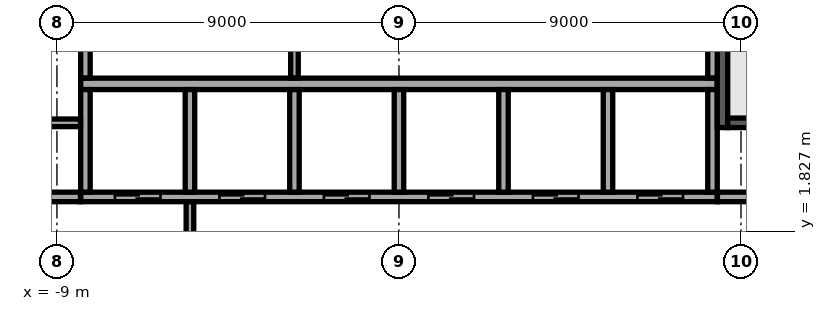
"""IFC4 building model, lengths in metres.
Left out: names, types, materials, properties, quantities, classifications, styles, units other than length and angle.
Written with IfcOpenShell. Run it as: python <this file> out.ifc"""

import sys

from ifc_helpers import new_model, si_unit, direction, frame, frame_2d, origin, place, context, subcontext, project, spatial, rectangle, extrude, element, fill, save


model = new_model("IFC4")
c1 = context("Model", 3, precision=1e-05, world=origin(), true_north=direction((0.0, 1.0)))
c2 = subcontext(c1, "Body", "Model", "MODEL_VIEW")
j1 = project(units=[si_unit("LENGTHUNIT", "METRE"), si_unit("PLANEANGLEUNIT", "RADIAN")], contexts=[c1])
p1 = place(None, origin())
s1 = spatial("IfcSite", under=j1, at=p1, CompositionType="ELEMENT")
p2 = place(p1, origin())
s2 = spatial("IfcBuilding", under=s1, at=p2, CompositionType="ELEMENT")
p3 = place(p2, frame((0.0, 0.0, 225.3)))
s3 = spatial("IfcBuildingStorey", under=s2, at=p3, CompositionType="ELEMENT", Elevation=225.3)
p4 = place(p3, frame((-8.375, 5.7, 0.0), z_axis=(0.0, 0.0, 1.0), x_axis=(1.0, 0.0, 0.0)))
e1 = element("IfcWall", 1, at=p4, inside=s3, PredefinedType="SOLIDWALL", context=c2, shape_type="SweptSolid", body=[
    extrude(rectangle(XDim=16.75, YDim=0.3, at=frame_2d((8.375, 0.0))), origin(), (0.0, 0.0, 1.0), 3.62),
])
p5 = place(p3, frame((-8.375, 2.725, 0.0), z_axis=(0.0, 0.0, 1.0), x_axis=(1.0, 0.0, 0.0)))
e2 = element("IfcWall", 2, at=p5, inside=s3, PredefinedType="SOLIDWALL", context=c2, shape_type="SweptSolid", body=[
    extrude(rectangle(XDim=16.75, YDim=0.25, at=frame_2d((8.375, 0.0))), origin(), (0.0, 0.0, 1.0), 3.62),
])
p6 = place(p5, frame((0.9, 0.0, 0.0)))
e3 = element("IfcOpeningElement", 3, at=p6, cuts=e2, PredefinedType="OPENING", context=c2, shape_type="SweptSolid", body=[
    extrude(rectangle(XDim=1.2, YDim=2.1, at=frame_2d((0.6, 1.05))), frame((0.0, 0.135, 0.0), z_axis=(0.0, -1.0, 0.0), x_axis=(1.0, 0.0, 0.0)), (0.0, 0.0, 1.0), 0.27),
])
p7 = place(p5, frame((3.65, 0.0, 0.0)))
e4 = element("IfcOpeningElement", 4, at=p7, cuts=e2, PredefinedType="OPENING", context=c2, shape_type="SweptSolid", body=[
    extrude(rectangle(XDim=1.2, YDim=2.1, at=frame_2d((0.6, 1.05))), frame((0.0, 0.135, 0.0), z_axis=(0.0, -1.0, 0.0), x_axis=(1.0, 0.0, 0.0)), (0.0, 0.0, 1.0), 0.27),
])
p8 = place(p5, frame((6.4, 0.0, 0.0)))
e5 = element("IfcOpeningElement", 5, at=p8, cuts=e2, PredefinedType="OPENING", context=c2, shape_type="SweptSolid", body=[
    extrude(rectangle(XDim=1.2, YDim=2.1, at=frame_2d((0.6, 1.05))), frame((0.0, 0.135, 0.0), z_axis=(0.0, -1.0, 0.0), x_axis=(1.0, 0.0, 0.0)), (0.0, 0.0, 1.0), 0.27),
])
p9 = place(p5, frame((9.15, 0.0, 0.0)))
e6 = element("IfcOpeningElement", 6, at=p9, cuts=e2, PredefinedType="OPENING", context=c2, shape_type="SweptSolid", body=[
    extrude(rectangle(XDim=1.2, YDim=2.1, at=frame_2d((0.6, 1.05))), frame((0.0, 0.135, 0.0), z_axis=(0.0, -1.0, 0.0), x_axis=(1.0, 0.0, 0.0)), (0.0, 0.0, 1.0), 0.27),
])
p10 = place(p5, frame((11.9, 0.0, 0.0)))
e7 = element("IfcOpeningElement", 7, at=p10, cuts=e2, PredefinedType="OPENING", context=c2, shape_type="SweptSolid", body=[
    extrude(rectangle(XDim=1.2, YDim=2.1, at=frame_2d((0.6, 1.05))), frame((0.0, 0.135, 0.0), z_axis=(0.0, -1.0, 0.0), x_axis=(1.0, 0.0, 0.0)), (0.0, 0.0, 1.0), 0.27),
])
p11 = place(p5, frame((14.65, 0.0, 0.0)))
e8 = element("IfcOpeningElement", 8, at=p11, cuts=e2, PredefinedType="OPENING", context=c2, shape_type="SweptSolid", body=[
    extrude(rectangle(XDim=1.2, YDim=2.1, at=frame_2d((0.6, 1.05))), frame((0.0, 0.135, 0.0), z_axis=(0.0, -1.0, 0.0), x_axis=(1.0, 0.0, 0.0)), (0.0, 0.0, 1.0), 0.27),
])
for number, where, z_axis, x_axis in (
    (9, (-8.25, 2.85, 0.0), (0.0, 0.0, 1.0), (0.0, 1.0, 0.0)),
    (10, (-5.5, 2.85, 0.0), (0.0, 0.0, 1.0), (0.0, 1.0, 0.0)),
    (11, (-2.75, 2.85, 0.0), (0.0, 0.0, 1.0), (0.0, 1.0, 0.0)),
    (12, (0.0, 2.85, 0.0), (0.0, 0.0, 1.0), (0.0, 1.0, 0.0)),
    (13, (2.75, 2.85, 0.0), (0.0, 0.0, 1.0), (0.0, 1.0, 0.0)),
    (14, (5.5, 2.85, 0.0), (0.0, 0.0, 1.0), (0.0, 1.0, 0.0)),
    (15, (8.25, 2.85, 0.0), (0.0, 0.0, 1.0), (0.0, 1.0, 0.0)),
):
    element("IfcWall", number, at=place(p3, frame(where, z_axis=z_axis, x_axis=x_axis)), inside=s3, PredefinedType="SOLIDWALL", context=c2, shape_type="SweptSolid", body=[
        extrude(rectangle(XDim=2.7, YDim=0.25, at=frame_2d((1.35, 0.0))), origin(), (0.0, 0.0, 1.0), 3.62),
    ])
p12 = place(p3, frame((8.512, 4.55, 0.0), z_axis=(0.0, 0.0, 1.0), x_axis=(0.0, 1.0, 0.0)))
e16 = element("IfcWall", 16, at=p12, inside=s3, PredefinedType="SOLIDWALL", context=c2, shape_type="SweptSolid", body=[
    extrude(rectangle(XDim=7.25, YDim=0.275, at=frame_2d((3.625, 0.0))), origin(), (0.0, 0.0, 1.0), 3.62),
])
p13 = place(p12, frame((6.0, 0.0, 0.0)))
e17 = element("IfcOpeningElement", 17, at=p13, cuts=e16, PredefinedType="OPENING", context=c2, shape_type="SweptSolid", body=[
    extrude(rectangle(XDim=1.0, YDim=2.1, at=frame_2d((0.5, 1.05))), frame((0.0, 0.147, 0.0), z_axis=(0.0, -1.0, 0.0), x_axis=(1.0, 0.0, 0.0)), (0.0, 0.0, 1.0), 0.295),
])
p14 = place(p3, frame((8.65, 4.675, 0.0), z_axis=(0.0, 0.0, 1.0), x_axis=(1.0, 0.0, 0.0)))
e18 = element("IfcWall", 18, at=p14, inside=s3, PredefinedType="SOLIDWALL", context=c2, shape_type="SweptSolid", body=[
    extrude(rectangle(XDim=3.15, YDim=0.25, at=frame_2d((1.575, 0.0))), origin(), (0.0, 0.0, 1.0), 3.62),
])
p15 = place(p3, frame((-5.5, -2.595, 0.0), z_axis=(0.0, 0.0, 1.0), x_axis=(0.0, 1.0, 0.0)))
e19 = element("IfcWall", 19, at=p15, inside=s3, PredefinedType="PARTITIONING", context=c2, shape_type="SweptSolid", body=[
    extrude(rectangle(XDim=5.19, YDim=0.2, at=frame_2d((2.595, 0.0))), origin(), (0.0, 0.0, 1.0), 3.62),
])
p16 = place(p15, frame((1.395, 0.0, 0.0)))
e20 = element("IfcOpeningElement", 20, at=p16, cuts=e19, PredefinedType="OPENING", context=c2, shape_type="SweptSolid", body=[
    extrude(rectangle(XDim=2.4, YDim=2.4, at=frame_2d((1.2, 1.2))), frame((0.0, 0.11, 0.0), z_axis=(0.0, -1.0, 0.0), x_axis=(1.0, 0.0, 0.0)), (0.0, 0.0, 1.0), 0.22),
])
p17 = place(p3, frame((-11.795, 2.725, 0.0), z_axis=(0.0, 0.0, 1.0), x_axis=(1.0, 0.0, 0.0)))
e21 = element("IfcWall", 21, at=p17, inside=s3, PredefinedType="PARTITIONING", context=c2, shape_type="SweptSolid", body=[
    extrude(rectangle(XDim=3.415, YDim=0.25, at=frame_2d((1.708, 0.0))), origin(), (0.0, 0.0, 1.0), 3.62),
])
p18 = place(p17, frame((1.345, 0.0, 0.0)))
e22 = element("IfcOpeningElement", 22, at=p18, cuts=e21, PredefinedType="OPENING", context=c2, shape_type="SweptSolid", body=[
    extrude(rectangle(XDim=0.9, YDim=2.1, at=frame_2d((0.45, 1.05))), frame((0.0, 0.135, 0.0), z_axis=(0.0, -1.0, 0.0), x_axis=(1.0, 0.0, 0.0)), (0.0, 0.0, 1.0), 0.27),
])
p19 = place(p3, frame((8.38, 2.725, 0.0), z_axis=(0.0, 0.0, 1.0), x_axis=(1.0, 0.0, 0.0)))
e23 = element("IfcWall", 23, at=p19, inside=s3, PredefinedType="PARTITIONING", context=c2, shape_type="SweptSolid", body=[
    extrude(rectangle(XDim=3.415, YDim=0.25, at=frame_2d((1.708, 0.0))), origin(), (0.0, 0.0, 1.0), 3.62),
])
p20 = place(p19, frame((1.17, 0.0, 0.0)))
e24 = element("IfcOpeningElement", 24, at=p20, cuts=e23, PredefinedType="OPENING", context=c2, shape_type="SweptSolid", body=[
    extrude(rectangle(XDim=0.9, YDim=2.1, at=frame_2d((0.45, 1.05))), frame((0.0, 0.135, 0.0), z_axis=(0.0, -1.0, 0.0), x_axis=(1.0, 0.0, 0.0)), (0.0, 0.0, 1.0), 0.27),
])
p21 = place(p3, frame((-11.795, 4.675, 0.0), z_axis=(0.0, 0.0, 1.0), x_axis=(1.0, 0.0, 0.0)))
e25 = element("IfcWall", 25, at=p21, inside=s3, PredefinedType="PARTITIONING", context=c2, shape_type="SweptSolid", body=[
    extrude(rectangle(XDim=3.415, YDim=0.2, at=frame_2d((1.708, 0.0))), origin(), (0.0, 0.0, 1.0), 3.62),
])
p22 = place(p3, frame((-8.25, 5.855, 0.0), z_axis=(0.0, 0.0, 1.0), x_axis=(0.0, 1.0, 0.0)))
e26 = element("IfcWall", 26, at=p22, inside=s3, PredefinedType="PARTITIONING", context=c2, shape_type="SweptSolid", body=[
    extrude(rectangle(XDim=2.69, YDim=0.25, at=frame_2d((1.345, 0.0))), origin(), (0.0, 0.0, 1.0), 3.62),
])
p23 = place(p3, frame((-2.75, 5.855, 0.0), z_axis=(0.0, 0.0, 1.0), x_axis=(0.0, 1.0, 0.0)))
e27 = element("IfcWall", 27, at=p23, inside=s3, PredefinedType="PARTITIONING", context=c2, shape_type="SweptSolid", body=[
    extrude(rectangle(XDim=2.69, YDim=0.2, at=frame_2d((1.345, 0.0))), origin(), (0.0, 0.0, 1.0), 3.62),
])
p24 = place(p3, frame((8.25, 5.855, 0.0), z_axis=(0.0, 0.0, 1.0), x_axis=(0.0, 1.0, 0.0)))
e28 = element("IfcWall", 28, at=p24, inside=s3, PredefinedType="PARTITIONING", context=c2, shape_type="SweptSolid", body=[
    extrude(rectangle(XDim=2.69, YDim=0.25, at=frame_2d((1.345, 0.0))), origin(), (0.0, 0.0, 1.0), 3.62),
])
p25 = place(p3, frame((-3.777, 34.584, 0.0), z_axis=(0.0, 0.0, 1.0), x_axis=(-0.629323778295, -0.777143218508, 0.0)))
e29 = element("IfcWall", 29, at=p25, inside=s3, PredefinedType="STANDARD", context=c2, shape_type="SweptSolid", body=[
    extrude(rectangle(XDim=49.0, YDim=0.6, at=frame_2d((24.5, 0.0))), origin(), (0.0, 0.0, 1.0), 3.62),
])
p26 = place(p25, frame((1.227, 0.0, 0.9)))
e30 = element("IfcOpeningElement", 30, at=p26, cuts=e29, PredefinedType="OPENING", context=c2, shape_type="SweptSolid", body=[
    extrude(rectangle(XDim=2.0, YDim=2.1, at=frame_2d((1.0, 1.05))), frame((0.0, 0.31, 0.0), z_axis=(0.0, -1.0, 0.0), x_axis=(1.0, 0.0, 0.0)), (0.0, 0.0, 1.0), 0.62),
])
p27 = place(p25, frame((5.682, 0.0, 0.9)))
e31 = element("IfcOpeningElement", 31, at=p27, cuts=e29, PredefinedType="OPENING", context=c2, shape_type="SweptSolid", body=[
    extrude(rectangle(XDim=2.0, YDim=2.1, at=frame_2d((1.0, 1.05))), frame((0.0, 0.31, 0.0), z_axis=(0.0, -1.0, 0.0), x_axis=(1.0, 0.0, 0.0)), (0.0, 0.0, 1.0), 0.62),
])
p28 = place(p25, frame((10.136, 0.0, 0.9)))
e32 = element("IfcOpeningElement", 32, at=p28, cuts=e29, PredefinedType="OPENING", context=c2, shape_type="SweptSolid", body=[
    extrude(rectangle(XDim=2.0, YDim=2.1, at=frame_2d((1.0, 1.05))), frame((0.0, 0.31, 0.0), z_axis=(0.0, -1.0, 0.0), x_axis=(1.0, 0.0, 0.0)), (0.0, 0.0, 1.0), 0.62),
])
p29 = place(p25, frame((14.591, 0.0, 0.9)))
e33 = element("IfcOpeningElement", 33, at=p29, cuts=e29, PredefinedType="OPENING", context=c2, shape_type="SweptSolid", body=[
    extrude(rectangle(XDim=2.0, YDim=2.1, at=frame_2d((1.0, 1.05))), frame((0.0, 0.31, 0.0), z_axis=(0.0, -1.0, 0.0), x_axis=(1.0, 0.0, 0.0)), (0.0, 0.0, 1.0), 0.62),
])
p30 = place(p25, frame((19.045, 0.0, 0.9)))
e34 = element("IfcOpeningElement", 34, at=p30, cuts=e29, PredefinedType="OPENING", context=c2, shape_type="SweptSolid", body=[
    extrude(rectangle(XDim=2.0, YDim=2.1, at=frame_2d((1.0, 1.05))), frame((0.0, 0.31, 0.0), z_axis=(0.0, -1.0, 0.0), x_axis=(1.0, 0.0, 0.0)), (0.0, 0.0, 1.0), 0.62),
])
p31 = place(p25, frame((23.5, 0.0, 0.9)))
e35 = element("IfcOpeningElement", 35, at=p31, cuts=e29, PredefinedType="OPENING", context=c2, shape_type="SweptSolid", body=[
    extrude(rectangle(XDim=2.0, YDim=2.1, at=frame_2d((1.0, 1.05))), frame((0.0, 0.31, 0.0), z_axis=(0.0, -1.0, 0.0), x_axis=(1.0, 0.0, 0.0)), (0.0, 0.0, 1.0), 0.62),
])
p32 = place(p25, frame((27.955, 0.0, 0.9)))
e36 = element("IfcOpeningElement", 36, at=p32, cuts=e29, PredefinedType="OPENING", context=c2, shape_type="SweptSolid", body=[
    extrude(rectangle(XDim=2.0, YDim=2.1, at=frame_2d((1.0, 1.05))), frame((0.0, 0.31, 0.0), z_axis=(0.0, -1.0, 0.0), x_axis=(1.0, 0.0, 0.0)), (0.0, 0.0, 1.0), 0.62),
])
p33 = place(p25, frame((32.409, 0.0, 0.9)))
e37 = element("IfcOpeningElement", 37, at=p33, cuts=e29, PredefinedType="OPENING", context=c2, shape_type="SweptSolid", body=[
    extrude(rectangle(XDim=2.0, YDim=2.1, at=frame_2d((1.0, 1.05))), frame((0.0, 0.31, 0.0), z_axis=(0.0, -1.0, 0.0), x_axis=(1.0, 0.0, 0.0)), (0.0, 0.0, 1.0), 0.62),
])
p34 = place(p25, frame((36.864, 0.0, 0.9)))
e38 = element("IfcOpeningElement", 38, at=p34, cuts=e29, PredefinedType="OPENING", context=c2, shape_type="SweptSolid", body=[
    extrude(rectangle(XDim=2.0, YDim=2.1, at=frame_2d((1.0, 1.05))), frame((0.0, 0.31, 0.0), z_axis=(0.0, -1.0, 0.0), x_axis=(1.0, 0.0, 0.0)), (0.0, 0.0, 1.0), 0.62),
])
p35 = place(p25, frame((41.318, 0.0, 0.9)))
e39 = element("IfcOpeningElement", 39, at=p35, cuts=e29, PredefinedType="OPENING", context=c2, shape_type="SweptSolid", body=[
    extrude(rectangle(XDim=2.0, YDim=2.1, at=frame_2d((1.0, 1.05))), frame((0.0, 0.31, 0.0), z_axis=(0.0, -1.0, 0.0), x_axis=(1.0, 0.0, 0.0)), (0.0, 0.0, 1.0), 0.62),
])
p36 = place(p25, frame((45.773, 0.0, 0.9)))
e40 = element("IfcOpeningElement", 40, at=p36, cuts=e29, PredefinedType="OPENING", context=c2, shape_type="SweptSolid", body=[
    extrude(rectangle(XDim=2.0, YDim=2.1, at=frame_2d((1.0, 1.05))), frame((0.0, 0.31, 0.0), z_axis=(0.0, -1.0, 0.0), x_axis=(1.0, 0.0, 0.0)), (0.0, 0.0, 1.0), 0.62),
])
p37 = place(p3, frame((3.777, -34.584, 0.0), z_axis=(0.0, 0.0, 1.0), x_axis=(0.629323778295, 0.777143218508, 0.0)))
e41 = element("IfcWall", 41, at=p37, inside=s3, PredefinedType="STANDARD", context=c2, shape_type="SweptSolid", body=[
    extrude(rectangle(XDim=49.0, YDim=0.6, at=frame_2d((24.5, 0.0))), origin(), (0.0, 0.0, 1.0), 3.62),
])
p38 = place(p37, frame((1.227, 0.0, 0.9)))
e42 = element("IfcOpeningElement", 42, at=p38, cuts=e41, PredefinedType="OPENING", context=c2, shape_type="SweptSolid", body=[
    extrude(rectangle(XDim=2.0, YDim=2.1, at=frame_2d((1.0, 1.05))), frame((0.0, 0.31, 0.0), z_axis=(0.0, -1.0, 0.0), x_axis=(1.0, 0.0, 0.0)), (0.0, 0.0, 1.0), 0.62),
])
p39 = place(p37, frame((5.682, 0.0, 0.9)))
e43 = element("IfcOpeningElement", 43, at=p39, cuts=e41, PredefinedType="OPENING", context=c2, shape_type="SweptSolid", body=[
    extrude(rectangle(XDim=2.0, YDim=2.1, at=frame_2d((1.0, 1.05))), frame((0.0, 0.31, 0.0), z_axis=(0.0, -1.0, 0.0), x_axis=(1.0, 0.0, 0.0)), (0.0, 0.0, 1.0), 0.62),
])
p40 = place(p37, frame((10.136, 0.0, 0.9)))
e44 = element("IfcOpeningElement", 44, at=p40, cuts=e41, PredefinedType="OPENING", context=c2, shape_type="SweptSolid", body=[
    extrude(rectangle(XDim=2.0, YDim=2.1, at=frame_2d((1.0, 1.05))), frame((0.0, 0.31, 0.0), z_axis=(0.0, -1.0, 0.0), x_axis=(1.0, 0.0, 0.0)), (0.0, 0.0, 1.0), 0.62),
])
p41 = place(p37, frame((14.591, 0.0, 0.9)))
e45 = element("IfcOpeningElement", 45, at=p41, cuts=e41, PredefinedType="OPENING", context=c2, shape_type="SweptSolid", body=[
    extrude(rectangle(XDim=2.0, YDim=2.1, at=frame_2d((1.0, 1.05))), frame((0.0, 0.31, 0.0), z_axis=(0.0, -1.0, 0.0), x_axis=(1.0, 0.0, 0.0)), (0.0, 0.0, 1.0), 0.62),
])
p42 = place(p37, frame((19.045, 0.0, 0.9)))
e46 = element("IfcOpeningElement", 46, at=p42, cuts=e41, PredefinedType="OPENING", context=c2, shape_type="SweptSolid", body=[
    extrude(rectangle(XDim=2.0, YDim=2.1, at=frame_2d((1.0, 1.05))), frame((0.0, 0.31, 0.0), z_axis=(0.0, -1.0, 0.0), x_axis=(1.0, 0.0, 0.0)), (0.0, 0.0, 1.0), 0.62),
])
p43 = place(p37, frame((23.5, 0.0, 0.9)))
e47 = element("IfcOpeningElement", 47, at=p43, cuts=e41, PredefinedType="OPENING", context=c2, shape_type="SweptSolid", body=[
    extrude(rectangle(XDim=2.0, YDim=2.1, at=frame_2d((1.0, 1.05))), frame((0.0, 0.31, 0.0), z_axis=(0.0, -1.0, 0.0), x_axis=(1.0, 0.0, 0.0)), (0.0, 0.0, 1.0), 0.62),
])
p44 = place(p37, frame((27.955, 0.0, 0.9)))
e48 = element("IfcOpeningElement", 48, at=p44, cuts=e41, PredefinedType="OPENING", context=c2, shape_type="SweptSolid", body=[
    extrude(rectangle(XDim=2.0, YDim=2.1, at=frame_2d((1.0, 1.05))), frame((0.0, 0.31, 0.0), z_axis=(0.0, -1.0, 0.0), x_axis=(1.0, 0.0, 0.0)), (0.0, 0.0, 1.0), 0.62),
])
p45 = place(p37, frame((32.409, 0.0, 0.9)))
e49 = element("IfcOpeningElement", 49, at=p45, cuts=e41, PredefinedType="OPENING", context=c2, shape_type="SweptSolid", body=[
    extrude(rectangle(XDim=2.0, YDim=2.1, at=frame_2d((1.0, 1.05))), frame((0.0, 0.31, 0.0), z_axis=(0.0, -1.0, 0.0), x_axis=(1.0, 0.0, 0.0)), (0.0, 0.0, 1.0), 0.62),
])
p46 = place(p37, frame((36.864, 0.0, 0.9)))
e50 = element("IfcOpeningElement", 50, at=p46, cuts=e41, PredefinedType="OPENING", context=c2, shape_type="SweptSolid", body=[
    extrude(rectangle(XDim=2.0, YDim=2.1, at=frame_2d((1.0, 1.05))), frame((0.0, 0.31, 0.0), z_axis=(0.0, -1.0, 0.0), x_axis=(1.0, 0.0, 0.0)), (0.0, 0.0, 1.0), 0.62),
])
p47 = place(p37, frame((41.318, 0.0, 0.9)))
e51 = element("IfcOpeningElement", 51, at=p47, cuts=e41, PredefinedType="OPENING", context=c2, shape_type="SweptSolid", body=[
    extrude(rectangle(XDim=2.0, YDim=2.1, at=frame_2d((1.0, 1.05))), frame((0.0, 0.31, 0.0), z_axis=(0.0, -1.0, 0.0), x_axis=(1.0, 0.0, 0.0)), (0.0, 0.0, 1.0), 0.62),
])
p48 = place(p37, frame((45.773, 0.0, 0.9)))
e52 = element("IfcOpeningElement", 52, at=p48, cuts=e41, PredefinedType="OPENING", context=c2, shape_type="SweptSolid", body=[
    extrude(rectangle(XDim=2.0, YDim=2.1, at=frame_2d((1.0, 1.05))), frame((0.0, 0.31, 0.0), z_axis=(0.0, -1.0, 0.0), x_axis=(1.0, 0.0, 0.0)), (0.0, 0.0, 1.0), 0.62),
])
p49 = place(p3, frame((-26.769, -2.487, 0.0), z_axis=(0.0, 0.0, 1.0), x_axis=(0.629320703929, 0.777145708092, 0.0)))
e53 = element("IfcWall", 53, at=p49, inside=s3, PredefinedType="PARTITIONING", context=c2, shape_type="SweptSolid", body=[
    extrude(rectangle(XDim=37.558, YDim=0.15, at=frame_2d((18.779, 0.0))), origin(), (0.0, 0.0, 1.0), 2.97),
])
p50 = place(p49, frame((3.55, 0.0, 0.0)))
e54 = element("IfcOpeningElement", 54, at=p50, cuts=e53, PredefinedType="OPENING", context=c2, shape_type="SweptSolid", body=[
    extrude(rectangle(XDim=1.0, YDim=2.1, at=frame_2d((0.5, 1.05))), frame((0.0, 0.085, 0.0), z_axis=(0.0, -1.0, 0.0), x_axis=(1.0, 0.0, 0.0)), (0.0, 0.0, 1.0), 0.17),
])
p51 = place(p49, frame((11.862, 0.0, 0.0)))
e55 = element("IfcOpeningElement", 55, at=p51, cuts=e53, PredefinedType="OPENING", context=c2, shape_type="SweptSolid", body=[
    extrude(rectangle(XDim=1.0, YDim=2.1, at=frame_2d((0.5, 1.05))), frame((0.0, 0.085, 0.0), z_axis=(0.0, -1.0, 0.0), x_axis=(1.0, 0.0, 0.0)), (0.0, 0.0, 1.0), 0.17),
])
p52 = place(p49, frame((21.452, 0.0, 0.0)))
e56 = element("IfcOpeningElement", 56, at=p52, cuts=e53, PredefinedType="OPENING", context=c2, shape_type="SweptSolid", body=[
    extrude(rectangle(XDim=1.0, YDim=2.1, at=frame_2d((0.5, 1.05))), frame((0.0, 0.085, 0.0), z_axis=(0.0, -1.0, 0.0), x_axis=(1.0, 0.0, 0.0)), (0.0, 0.0, 1.0), 0.17),
])
p53 = place(p49, frame((31.223, 0.0, 0.0)))
e57 = element("IfcOpeningElement", 57, at=p53, cuts=e53, PredefinedType="OPENING", context=c2, shape_type="SweptSolid", body=[
    extrude(rectangle(XDim=1.0, YDim=2.1, at=frame_2d((0.5, 1.05))), frame((0.0, 0.085, 0.0), z_axis=(0.0, -1.0, 0.0), x_axis=(1.0, 0.0, 0.0)), (0.0, 0.0, 1.0), 0.17),
])
p54 = place(p49, frame((35.359, 0.0, 0.0)))
e58 = element("IfcOpeningElement", 58, at=p54, cuts=e53, PredefinedType="OPENING", context=c2, shape_type="SweptSolid", body=[
    extrude(rectangle(XDim=1.0, YDim=2.1, at=frame_2d((0.5, 1.05))), frame((0.0, 0.085, 0.0), z_axis=(0.0, -1.0, 0.0), x_axis=(1.0, 0.0, 0.0)), (0.0, 0.0, 1.0), 0.17),
])
p55 = place(p3, frame((3.18, -26.643, 0.0), z_axis=(0.0, 0.0, 1.0), x_axis=(0.629322822444, 0.777143992547, 0.0)))
e59 = element("IfcWall", 59, at=p55, inside=s3, PredefinedType="PARTITIONING", context=c2, shape_type="SweptSolid", body=[
    extrude(rectangle(XDim=37.483, YDim=0.15, at=frame_2d((18.741, 0.0))), origin(), (0.0, 0.0, 1.0), 3.17),
])
p56 = place(p55, frame((6.346, 0.0, 0.0)))
e60 = element("IfcOpeningElement", 60, at=p56, cuts=e59, PredefinedType="OPENING", context=c2, shape_type="SweptSolid", body=[
    extrude(rectangle(XDim=1.0, YDim=2.1, at=frame_2d((0.5, 1.05))), frame((0.0, 0.085, 0.0), z_axis=(0.0, -1.0, 0.0), x_axis=(1.0, 0.0, 0.0)), (0.0, 0.0, 1.0), 0.17),
])
p57 = place(p55, frame((16.452, 0.0, 0.0)))
e61 = element("IfcOpeningElement", 61, at=p57, cuts=e59, PredefinedType="OPENING", context=c2, shape_type="SweptSolid", body=[
    extrude(rectangle(XDim=1.0, YDim=2.1, at=frame_2d((0.5, 1.05))), frame((0.0, 0.085, 0.0), z_axis=(0.0, -1.0, 0.0), x_axis=(1.0, 0.0, 0.0)), (0.0, 0.0, 1.0), 0.17),
])
p58 = place(p55, frame((23.4, 0.0, 0.0)))
e62 = element("IfcOpeningElement", 62, at=p58, cuts=e59, PredefinedType="OPENING", context=c2, shape_type="SweptSolid", body=[
    extrude(rectangle(XDim=1.0, YDim=2.1, at=frame_2d((0.5, 1.05))), frame((0.0, 0.085, 0.0), z_axis=(0.0, -1.0, 0.0), x_axis=(1.0, 0.0, 0.0)), (0.0, 0.0, 1.0), 0.17),
])
p59 = place(p6, origin())
e63 = element("IfcDoor", 63, at=p59, inside=s3, OperationType="DOUBLE_DOOR_SLIDING", PredefinedType="DOOR", context=c2, shape_type="SweptSolid", body=[
    extrude(rectangle(XDim=1.2, YDim=2.1, at=frame_2d((0.6, 1.05))), frame((0.0, 0.025, 0.0), z_axis=(0.0, -1.0, 0.0), x_axis=(1.0, 0.0, 0.0)), (0.0, 0.0, 1.0), 0.05),
])
fill(e3, e63)
p60 = place(p7, origin())
e64 = element("IfcDoor", 64, at=p60, inside=s3, OperationType="DOUBLE_DOOR_SLIDING", PredefinedType="DOOR", context=c2, shape_type="SweptSolid", body=[
    extrude(rectangle(XDim=1.2, YDim=2.1, at=frame_2d((0.6, 1.05))), frame((0.0, 0.025, 0.0), z_axis=(0.0, -1.0, 0.0), x_axis=(1.0, 0.0, 0.0)), (0.0, 0.0, 1.0), 0.05),
])
fill(e4, e64)
p61 = place(p8, origin())
e65 = element("IfcDoor", 65, at=p61, inside=s3, OperationType="DOUBLE_DOOR_SLIDING", PredefinedType="DOOR", context=c2, shape_type="SweptSolid", body=[
    extrude(rectangle(XDim=1.2, YDim=2.1, at=frame_2d((0.6, 1.05))), frame((0.0, 0.025, 0.0), z_axis=(0.0, -1.0, 0.0), x_axis=(1.0, 0.0, 0.0)), (0.0, 0.0, 1.0), 0.05),
])
fill(e5, e65)
p62 = place(p9, origin())
e66 = element("IfcDoor", 66, at=p62, inside=s3, OperationType="DOUBLE_DOOR_SLIDING", PredefinedType="DOOR", context=c2, shape_type="SweptSolid", body=[
    extrude(rectangle(XDim=1.2, YDim=2.1, at=frame_2d((0.6, 1.05))), frame((0.0, 0.025, 0.0), z_axis=(0.0, -1.0, 0.0), x_axis=(1.0, 0.0, 0.0)), (0.0, 0.0, 1.0), 0.05),
])
fill(e6, e66)
p63 = place(p10, origin())
e67 = element("IfcDoor", 67, at=p63, inside=s3, OperationType="DOUBLE_DOOR_SLIDING", PredefinedType="DOOR", context=c2, shape_type="SweptSolid", body=[
    extrude(rectangle(XDim=1.2, YDim=2.1, at=frame_2d((0.6, 1.05))), frame((0.0, 0.025, 0.0), z_axis=(0.0, -1.0, 0.0), x_axis=(1.0, 0.0, 0.0)), (0.0, 0.0, 1.0), 0.05),
])
fill(e7, e67)
p64 = place(p11, origin())
e68 = element("IfcDoor", 68, at=p64, inside=s3, OperationType="DOUBLE_DOOR_SLIDING", PredefinedType="DOOR", context=c2, shape_type="SweptSolid", body=[
    extrude(rectangle(XDim=1.2, YDim=2.1, at=frame_2d((0.6, 1.05))), frame((0.0, 0.025, 0.0), z_axis=(0.0, -1.0, 0.0), x_axis=(1.0, 0.0, 0.0)), (0.0, 0.0, 1.0), 0.05),
])
fill(e8, e68)
save(model, sys.argv[1])
